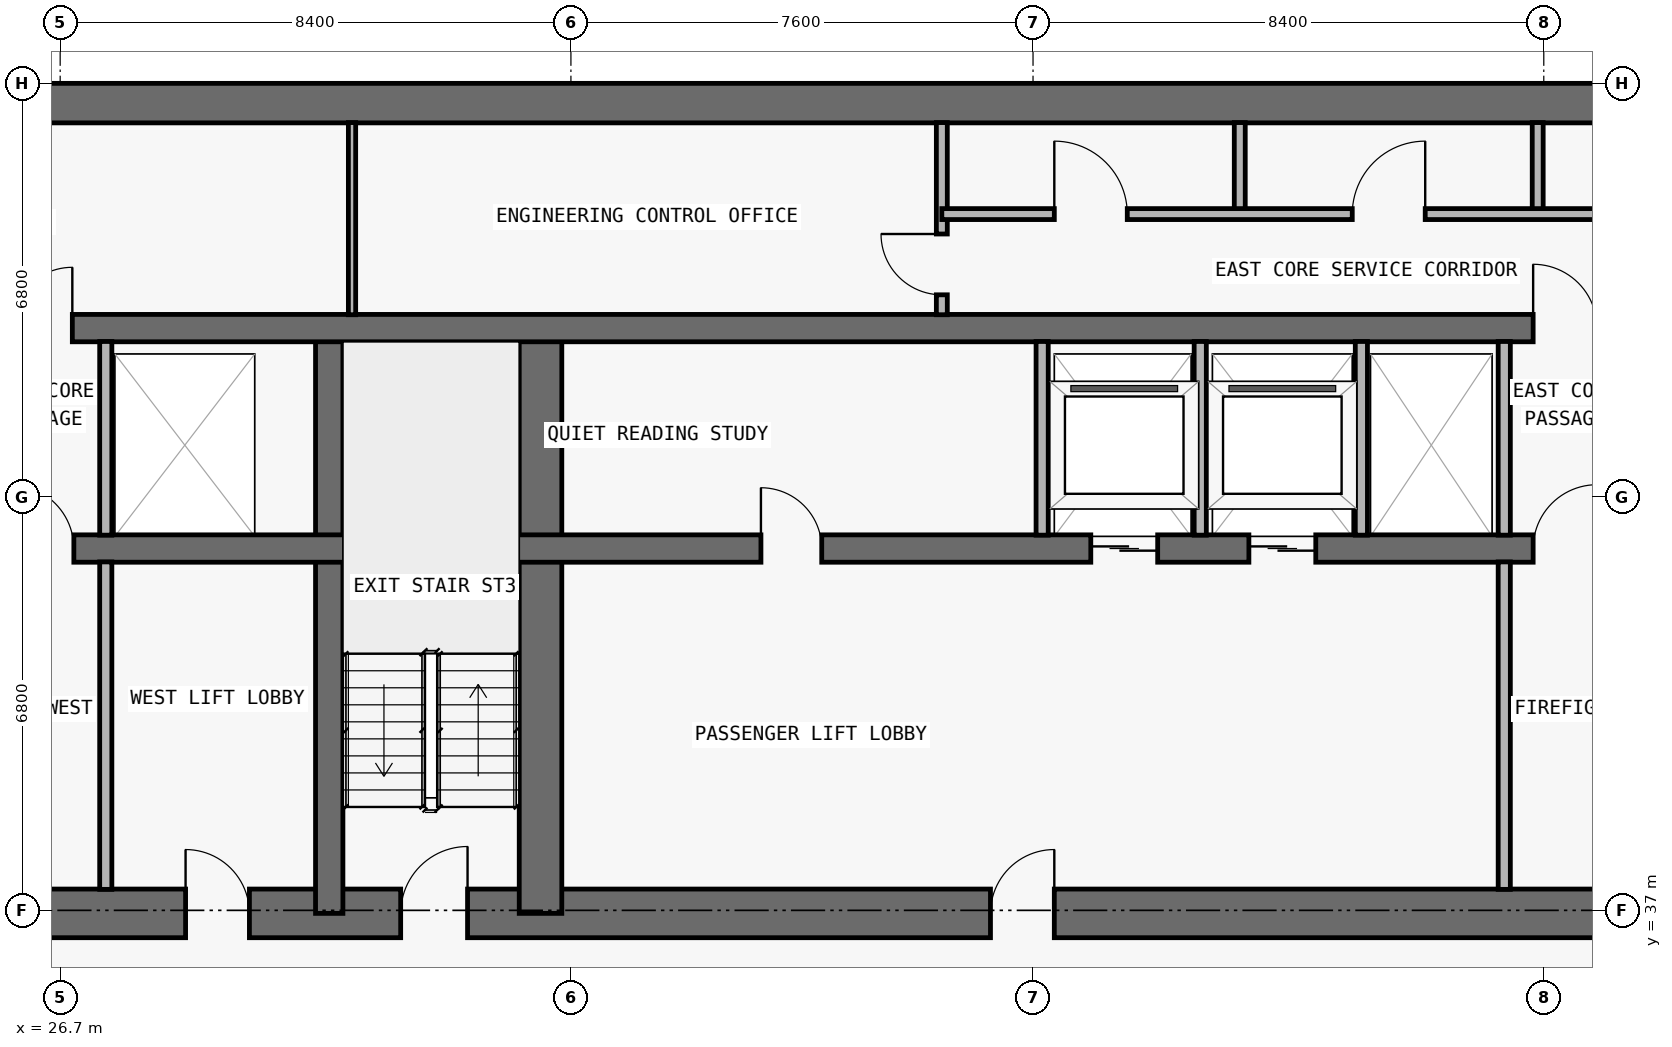
"""IFC4 building model, lengths in metres.
Left out: names, types, materials, properties, quantities, classifications, styles, units other than length and angle.
Written with IfcOpenShell. Run it as: python <this file> out.ifc"""

import sys

from ifc_helpers import new_model, si_unit, direction, frame, frame_2d, origin, place, context, subcontext, project, spatial, rectangle, extrude, element, fill, save


model = new_model("IFC4")
c1 = context("Model", 3, precision=1e-05, world=origin(), true_north=direction((0.0, 1.0)))
c2 = subcontext(c1, "Body", "Model", "MODEL_VIEW")
j1 = project(units=[si_unit("LENGTHUNIT", "METRE"), si_unit("PLANEANGLEUNIT", "RADIAN")], contexts=[c1])
p1 = place(None, origin())
s1 = spatial("IfcSite", under=j1, at=p1, CompositionType="ELEMENT")
p2 = place(p1, origin())
s2 = spatial("IfcBuilding", under=s1, at=p2, CompositionType="ELEMENT")
p3 = place(p2, frame((0.0, 0.0, 138.9)))
s3 = spatial("IfcBuildingStorey", under=s2, at=p3, CompositionType="ELEMENT", Elevation=138.9)
p4 = place(p3, frame((17.85, 36.95, 0.0), z_axis=(0.0, 0.0, 1.0), x_axis=(1.0, 0.0, 0.0)))
e1 = element("IfcWall", 1, at=p4, inside=s3, PredefinedType="SHEAR", context=c2, shape_type="SweptSolid", body=[
    extrude(rectangle(XDim=42.1, YDim=0.8, at=frame_2d((21.05, 0.0))), origin(), (0.0, 0.0, 1.0), 3.05),
])
p5 = place(p4, frame((14.45, 0.0, 0.0)))
e2 = element("IfcOpeningElement", 2, at=p5, cuts=e1, PredefinedType="OPENING", context=c2, shape_type="SweptSolid", body=[
    extrude(rectangle(XDim=1.1, YDim=2.15, at=frame_2d((0.55, 1.075))), frame((0.0, 0.41, 0.0), z_axis=(0.0, -1.0, 0.0), x_axis=(1.0, 0.0, 0.0)), (0.0, 0.0, 1.0), 0.82),
])
p6 = place(p4, frame((6.3, 0.0, 0.0)))
e3 = element("IfcOpeningElement", 3, at=p6, cuts=e1, PredefinedType="OPENING", context=c2, shape_type="SweptSolid", body=[
    extrude(rectangle(XDim=1.05, YDim=2.15, at=frame_2d((0.525, 1.075))), frame((0.0, 0.41, 0.0), z_axis=(0.0, -1.0, 0.0), x_axis=(1.0, 0.0, 0.0)), (0.0, 0.0, 1.0), 0.82),
])
p7 = place(p4, frame((34.8, 0.0, 0.0)))
e4 = element("IfcOpeningElement", 4, at=p7, cuts=e1, PredefinedType="OPENING", context=c2, shape_type="SweptSolid", body=[
    extrude(rectangle(XDim=1.05, YDim=2.15, at=frame_2d((0.525, 1.075))), frame((0.0, 0.41, 0.0), z_axis=(0.0, -1.0, 0.0), x_axis=(1.0, 0.0, 0.0)), (0.0, 0.0, 1.0), 0.82),
])
p8 = place(p4, frame((10.913, 0.0, 0.0)))
e5 = element("IfcOpeningElement", 5, at=p8, cuts=e1, PredefinedType="OPENING", context=c2, shape_type="SweptSolid", body=[
    extrude(rectangle(XDim=1.05, YDim=2.15, at=frame_2d((0.525, 1.075))), frame((0.0, 0.41, 0.0), z_axis=(0.0, -1.0, 0.0), x_axis=(1.0, 0.0, 0.0)), (0.0, 0.0, 1.0), 0.82),
])
p9 = place(p4, frame((24.15, 0.0, 0.0)))
e6 = element("IfcOpeningElement", 6, at=p9, cuts=e1, PredefinedType="OPENING", context=c2, shape_type="SweptSolid", body=[
    extrude(rectangle(XDim=1.05, YDim=2.15, at=frame_2d((0.525, 1.075))), frame((0.0, 0.41, 0.0), z_axis=(0.0, -1.0, 0.0), x_axis=(1.0, 0.0, 0.0)), (0.0, 0.0, 1.0), 0.82),
])
p10 = place(p3, frame((17.85, 50.275, 0.0), z_axis=(0.0, 0.0, 1.0), x_axis=(1.0, 0.0, 0.0)))
e7 = element("IfcWall", 7, at=p10, inside=s3, PredefinedType="SHEAR", context=c2, shape_type="SweptSolid", body=[
    extrude(rectangle(XDim=42.1, YDim=0.65, at=frame_2d((21.05, 0.0))), origin(), (0.0, 0.0, 1.0), 3.05),
])
p11 = place(p3, frame((31.125, 36.95, 0.0), z_axis=(0.0, 0.0, 1.0), x_axis=(0.0, 1.0, 0.0)))
e8 = element("IfcWall", 8, at=p11, inside=s3, PredefinedType="SHEAR", context=c2, shape_type="SweptSolid", body=[
    extrude(rectangle(XDim=9.625, YDim=0.45, at=frame_2d((4.812, 0.0))), origin(), (0.0, 0.0, 1.0), 3.05),
])
p12 = place(p3, frame((34.6, 36.95, 0.0), z_axis=(0.0, 0.0, 1.0), x_axis=(0.0, 1.0, 0.0)))
e9 = element("IfcWall", 9, at=p12, inside=s3, PredefinedType="SHEAR", context=c2, shape_type="SweptSolid", body=[
    extrude(rectangle(XDim=9.625, YDim=0.7, at=frame_2d((4.812, 0.0))), origin(), (0.0, 0.0, 1.0), 3.05),
])
p13 = place(p3, frame((22.25, 42.95, 0.0), z_axis=(0.0, 0.0, 1.0), x_axis=(1.0, 0.0, 0.0)))
e10 = element("IfcWall", 10, at=p13, inside=s3, PredefinedType="SHEAR", context=c2, shape_type="SweptSolid", body=[
    extrude(rectangle(XDim=33.3, YDim=0.45, at=frame_2d((16.65, 0.0))), origin(), (0.0, 0.0, 1.0), 3.05),
])
p14 = place(p13, frame((1.05, 0.0, 0.0)))
e11 = element("IfcOpeningElement", 11, at=p14, cuts=e10, PredefinedType="OPENING", context=c2, shape_type="SweptSolid", body=[
    extrude(rectangle(XDim=1.2, YDim=2.2, at=frame_2d((0.6, 1.1))), frame((0.0, 0.235, 0.0), z_axis=(0.0, -1.0, 0.0), x_axis=(1.0, 0.0, 0.0)), (0.0, 0.0, 1.0), 0.47),
])
p15 = place(p13, frame((31.05, 0.0, 0.0)))
e12 = element("IfcOpeningElement", 12, at=p15, cuts=e10, PredefinedType="OPENING", context=c2, shape_type="SweptSolid", body=[
    extrude(rectangle(XDim=1.2, YDim=2.2, at=frame_2d((0.6, 1.1))), frame((0.0, 0.235, 0.0), z_axis=(0.0, -1.0, 0.0), x_axis=(1.0, 0.0, 0.0)), (0.0, 0.0, 1.0), 0.47),
])
p16 = place(p13, frame((21.4, 0.0, 0.0)))
e13 = element("IfcOpeningElement", 13, at=p16, cuts=e10, PredefinedType="OPENING", context=c2, shape_type="SweptSolid", body=[
    extrude(rectangle(XDim=1.1, YDim=2.2, at=frame_2d((0.55, 1.1))), frame((0.0, 0.235, 0.0), z_axis=(0.0, -1.0, 0.0), x_axis=(1.0, 0.0, 0.0)), (0.0, 0.0, 1.0), 0.47),
])
p17 = place(p13, frame((24.0, 0.0, 0.0)))
e14 = element("IfcOpeningElement", 14, at=p17, cuts=e10, PredefinedType="OPENING", context=c2, shape_type="SweptSolid", body=[
    extrude(rectangle(XDim=1.1, YDim=2.2, at=frame_2d((0.55, 1.1))), frame((0.0, 0.235, 0.0), z_axis=(0.0, -1.0, 0.0), x_axis=(1.0, 0.0, 0.0)), (0.0, 0.0, 1.0), 0.47),
])
p18 = place(p13, frame((3.625, 0.0, 0.0)))
e15 = element("IfcOpeningElement", 15, at=p18, cuts=e10, PredefinedType="OPENING", context=c2, shape_type="SweptSolid", body=[
    extrude(rectangle(XDim=1.05, YDim=2.15, at=frame_2d((0.525, 1.075))), frame((0.0, 0.235, 0.0), z_axis=(0.0, -1.0, 0.0), x_axis=(1.0, 0.0, 0.0)), (0.0, 0.0, 1.0), 0.47),
])
p19 = place(p13, frame((28.675, 0.0, 0.0)))
e16 = element("IfcOpeningElement", 16, at=p19, cuts=e10, PredefinedType="OPENING", context=c2, shape_type="SweptSolid", body=[
    extrude(rectangle(XDim=1.05, YDim=2.15, at=frame_2d((0.525, 1.075))), frame((0.0, 0.235, 0.0), z_axis=(0.0, -1.0, 0.0), x_axis=(1.0, 0.0, 0.0)), (0.0, 0.0, 1.0), 0.47),
])
p20 = place(p13, frame((15.975, 0.0, 0.0)))
e17 = element("IfcOpeningElement", 17, at=p20, cuts=e10, PredefinedType="OPENING", context=c2, shape_type="SweptSolid", body=[
    extrude(rectangle(XDim=1.0, YDim=2.2, at=frame_2d((0.5, 1.1))), frame((0.0, 0.235, 0.0), z_axis=(0.0, -1.0, 0.0), x_axis=(1.0, 0.0, 0.0)), (0.0, 0.0, 1.0), 0.47),
])
p21 = place(p3, frame((18.25, 46.575, 0.0), z_axis=(0.0, 0.0, 1.0), x_axis=(1.0, 0.0, 0.0)))
e18 = element("IfcWall", 18, at=p21, inside=s3, PredefinedType="SHEAR", context=c2, shape_type="SweptSolid", body=[
    extrude(rectangle(XDim=41.3, YDim=0.45, at=frame_2d((20.65, 0.0))), origin(), (0.0, 0.0, 1.0), 3.05),
])
p22 = place(p21, frame((7.65, 0.0, 0.0)))
e19 = element("IfcOpeningElement", 19, at=p22, cuts=e18, PredefinedType="OPENING", context=c2, shape_type="SweptSolid", body=[
    extrude(rectangle(XDim=1.0, YDim=2.2, at=frame_2d((0.5, 1.1))), frame((0.0, 0.235, 0.0), z_axis=(0.0, -1.0, 0.0), x_axis=(1.0, 0.0, 0.0)), (0.0, 0.0, 1.0), 0.47),
])
p23 = place(p21, frame((32.675, 0.0, 0.0)))
e20 = element("IfcOpeningElement", 20, at=p23, cuts=e18, PredefinedType="OPENING", context=c2, shape_type="SweptSolid", body=[
    extrude(rectangle(XDim=1.05, YDim=2.15, at=frame_2d((0.525, 1.075))), frame((0.0, 0.235, 0.0), z_axis=(0.0, -1.0, 0.0), x_axis=(1.0, 0.0, 0.0)), (0.0, 0.0, 1.0), 0.47),
])
p24 = place(p3, frame((27.45, 37.345, 0.0), z_axis=(0.0, 0.0, 1.0), x_axis=(0.0, 1.0, 0.0)))
e21 = element("IfcWall", 21, at=p24, inside=s3, PredefinedType="PARTITIONING", context=c2, shape_type="SweptSolid", body=[
    extrude(rectangle(XDim=5.385, YDim=0.2, at=frame_2d((2.692, 0.0))), origin(), (0.0, 0.0, 1.0), 3.05),
])
p25 = place(p3, frame((27.45, 43.17, 0.0), z_axis=(0.0, 0.0, 1.0), x_axis=(0.0, 1.0, 0.0)))
e22 = element("IfcWall", 22, at=p25, inside=s3, PredefinedType="PARTITIONING", context=c2, shape_type="SweptSolid", body=[
    extrude(rectangle(XDim=3.185, YDim=0.2, at=frame_2d((1.593, 0.0))), origin(), (0.0, 0.0, 1.0), 3.05),
])
p26 = place(p3, frame((31.5, 46.795, 0.0), z_axis=(0.0, 0.0, 1.0), x_axis=(0.0, 1.0, 0.0)))
e23 = element("IfcWall", 23, at=p26, inside=s3, PredefinedType="PARTITIONING", context=c2, shape_type="SweptSolid", body=[
    extrude(rectangle(XDim=3.16, YDim=0.12, at=frame_2d((1.58, 0.0))), origin(), (0.0, 0.0, 1.0), 3.05),
])
p27 = place(p3, frame((41.2, 46.795, 0.0), z_axis=(0.0, 0.0, 1.0), x_axis=(0.0, 1.0, 0.0)))
e24 = element("IfcWall", 24, at=p27, inside=s3, PredefinedType="PARTITIONING", context=c2, shape_type="SweptSolid", body=[
    extrude(rectangle(XDim=3.16, YDim=0.18, at=frame_2d((1.58, 0.0))), origin(), (0.0, 0.0, 1.0), 3.05),
])
p28 = place(p27, frame((0.327, 0.0, 0.0)))
e25 = element("IfcOpeningElement", 25, at=p28, cuts=e24, PredefinedType="OPENING", context=c2, shape_type="SweptSolid", body=[
    extrude(rectangle(XDim=1.0, YDim=2.2, at=frame_2d((0.5, 1.1))), frame((0.0, 0.1, 0.0), z_axis=(0.0, -1.0, 0.0), x_axis=(1.0, 0.0, 0.0)), (0.0, 0.0, 1.0), 0.2),
])
for number, where, z_axis, x_axis in (
    (26, (42.85, 43.17, 0.0), (0.0, 0.0, 1.0), (0.0, 1.0, 0.0)),
    (27, (45.45, 43.17, 0.0), (0.0, 0.0, 1.0), (0.0, 1.0, 0.0)),
):
    element("IfcWall", number, at=place(p3, frame(where, z_axis=z_axis, x_axis=x_axis)), inside=s3, PredefinedType="PARTITIONING", context=c2, shape_type="SweptSolid", body=[
        extrude(rectangle(XDim=3.185, YDim=0.2, at=frame_2d((1.593, 0.0))), origin(), (0.0, 0.0, 1.0), 3.05),
    ])
p29 = place(p3, frame((46.1, 48.45, 0.0), z_axis=(0.0, 0.0, 1.0), x_axis=(0.0, 1.0, 0.0)))
e28 = element("IfcWall", 28, at=p29, inside=s3, PredefinedType="PARTITIONING", context=c2, shape_type="SweptSolid", body=[
    extrude(rectangle(XDim=1.505, YDim=0.18, at=frame_2d((0.752, 0.0))), origin(), (0.0, 0.0, 1.0), 3.05),
])
p30 = place(p3, frame((48.1, 43.17, 0.0), z_axis=(0.0, 0.0, 1.0), x_axis=(0.0, 1.0, 0.0)))
e29 = element("IfcWall", 29, at=p30, inside=s3, PredefinedType="PARTITIONING", context=c2, shape_type="SweptSolid", body=[
    extrude(rectangle(XDim=3.185, YDim=0.2, at=frame_2d((1.593, 0.0))), origin(), (0.0, 0.0, 1.0), 3.05),
])
p31 = place(p3, frame((50.45, 37.345, 0.0), z_axis=(0.0, 0.0, 1.0), x_axis=(0.0, 1.0, 0.0)))
e30 = element("IfcWall", 30, at=p31, inside=s3, PredefinedType="PARTITIONING", context=c2, shape_type="SweptSolid", body=[
    extrude(rectangle(XDim=5.385, YDim=0.2, at=frame_2d((2.692, 0.0))), origin(), (0.0, 0.0, 1.0), 3.05),
])
p32 = place(p3, frame((50.45, 43.17, 0.0), z_axis=(0.0, 0.0, 1.0), x_axis=(0.0, 1.0, 0.0)))
e31 = element("IfcWall", 31, at=p32, inside=s3, PredefinedType="PARTITIONING", context=c2, shape_type="SweptSolid", body=[
    extrude(rectangle(XDim=3.185, YDim=0.2, at=frame_2d((1.593, 0.0))), origin(), (0.0, 0.0, 1.0), 3.05),
])
p33 = place(p3, frame((51.0, 48.45, 0.0), z_axis=(0.0, 0.0, 1.0), x_axis=(0.0, 1.0, 0.0)))
e32 = element("IfcWall", 32, at=p33, inside=s3, PredefinedType="PARTITIONING", context=c2, shape_type="SweptSolid", body=[
    extrude(rectangle(XDim=1.505, YDim=0.18, at=frame_2d((0.752, 0.0))), origin(), (0.0, 0.0, 1.0), 3.05),
])
p34 = place(p3, frame((41.2, 48.45, 0.0), z_axis=(0.0, 0.0, 1.0), x_axis=(1.0, 0.0, 0.0)))
e33 = element("IfcWall", 33, at=p34, inside=s3, PredefinedType="PARTITIONING", context=c2, shape_type="SweptSolid", body=[
    extrude(rectangle(XDim=14.686, YDim=0.18, at=frame_2d((7.343, 0.0))), origin(), (0.0, 0.0, 1.0), 3.05),
])
p35 = place(p34, frame((1.85, 0.0, 0.0)))
e34 = element("IfcOpeningElement", 34, at=p35, cuts=e33, PredefinedType="OPENING", context=c2, shape_type="SweptSolid", body=[
    extrude(rectangle(XDim=1.2, YDim=2.2, at=frame_2d((0.6, 1.1))), frame((0.0, 0.1, 0.0), z_axis=(0.0, -1.0, 0.0), x_axis=(1.0, 0.0, 0.0)), (0.0, 0.0, 1.0), 0.2),
])
p36 = place(p34, frame((6.75, 0.0, 0.0)))
e35 = element("IfcOpeningElement", 35, at=p36, cuts=e33, PredefinedType="OPENING", context=c2, shape_type="SweptSolid", body=[
    extrude(rectangle(XDim=1.2, YDim=2.2, at=frame_2d((0.6, 1.1))), frame((0.0, 0.1, 0.0), z_axis=(0.0, -1.0, 0.0), x_axis=(1.0, 0.0, 0.0)), (0.0, 0.0, 1.0), 0.2),
])
p37 = place(p34, frame((11.818, 0.0, 0.0)))
e36 = element("IfcOpeningElement", 36, at=p37, cuts=e33, PredefinedType="OPENING", context=c2, shape_type="SweptSolid", body=[
    extrude(rectangle(XDim=0.85, YDim=2.1, at=frame_2d((0.425, 1.05))), frame((0.0, 0.1, 0.0), z_axis=(0.0, -1.0, 0.0), x_axis=(1.0, 0.0, 0.0)), (0.0, 0.0, 1.0), 0.2),
])
p38 = place(p16, origin())
e37 = element("IfcDoor", 37, at=p38, inside=s3, OperationType="DOUBLE_DOOR_SLIDING", PredefinedType="DOOR", context=c2, shape_type="SweptSolid", body=[
    extrude(rectangle(XDim=1.1, YDim=2.2, at=frame_2d((0.55, 1.1))), frame((0.0, 0.025, 0.0), z_axis=(0.0, -1.0, 0.0), x_axis=(1.0, 0.0, 0.0)), (0.0, 0.0, 1.0), 0.05),
])
fill(e13, e37)
p39 = place(p17, origin())
e38 = element("IfcDoor", 38, at=p39, inside=s3, OperationType="DOUBLE_DOOR_SLIDING", PredefinedType="DOOR", context=c2, shape_type="SweptSolid", body=[
    extrude(rectangle(XDim=1.1, YDim=2.2, at=frame_2d((0.55, 1.1))), frame((0.0, 0.025, 0.0), z_axis=(0.0, -1.0, 0.0), x_axis=(1.0, 0.0, 0.0)), (0.0, 0.0, 1.0), 0.05),
])
fill(e14, e38)
p40 = place(p5, origin())
e39 = element("IfcDoor", 39, at=p40, inside=s3, OperationType="SINGLE_SWING_RIGHT", PredefinedType="DOOR", context=c2, shape_type="SweptSolid", body=[
    extrude(rectangle(XDim=1.1, YDim=2.15, at=frame_2d((0.55, 1.075))), frame((0.0, 0.025, 0.0), z_axis=(0.0, -1.0, 0.0), x_axis=(1.0, 0.0, 0.0)), (0.0, 0.0, 1.0), 0.05),
])
fill(e2, e39)
p41 = place(p18, origin())
e40 = element("IfcDoor", 40, at=p41, inside=s3, OperationType="SINGLE_SWING_LEFT", PredefinedType="DOOR", context=c2, shape_type="SweptSolid", body=[
    extrude(rectangle(XDim=1.05, YDim=2.15, at=frame_2d((0.525, 1.075))), frame((0.0, 0.025, 0.0), z_axis=(0.0, -1.0, 0.0), x_axis=(1.0, 0.0, 0.0)), (0.0, 0.0, 1.0), 0.05),
])
fill(e15, e40)
p42 = place(p19, origin())
e41 = element("IfcDoor", 41, at=p42, inside=s3, OperationType="SINGLE_SWING_RIGHT", PredefinedType="DOOR", context=c2, shape_type="SweptSolid", body=[
    extrude(rectangle(XDim=1.05, YDim=2.15, at=frame_2d((0.525, 1.075))), frame((0.0, 0.025, 0.0), z_axis=(0.0, -1.0, 0.0), x_axis=(1.0, 0.0, 0.0)), (0.0, 0.0, 1.0), 0.05),
])
fill(e16, e41)
p43 = place(p8, origin())
e42 = element("IfcDoor", 42, at=p43, inside=s3, OperationType="SINGLE_SWING_LEFT", PredefinedType="DOOR", context=c2, shape_type="SweptSolid", body=[
    extrude(rectangle(XDim=1.05, YDim=2.15, at=frame_2d((0.525, 1.075))), frame((0.0, 0.025, 0.0), z_axis=(0.0, -1.0, 0.0), x_axis=(1.0, 0.0, 0.0)), (0.0, 0.0, 1.0), 0.05),
])
fill(e5, e42)
p44 = place(p9, origin())
e43 = element("IfcDoor", 43, at=p44, inside=s3, OperationType="SINGLE_SWING_RIGHT", PredefinedType="DOOR", context=c2, shape_type="SweptSolid", body=[
    extrude(rectangle(XDim=1.05, YDim=2.15, at=frame_2d((0.525, 1.075))), frame((0.0, 0.025, 0.0), z_axis=(0.0, -1.0, 0.0), x_axis=(1.0, 0.0, 0.0)), (0.0, 0.0, 1.0), 0.05),
])
fill(e6, e43)
p45 = place(p20, origin())
e44 = element("IfcDoor", 44, at=p45, inside=s3, OperationType="SINGLE_SWING_LEFT", PredefinedType="DOOR", context=c2, shape_type="SweptSolid", body=[
    extrude(rectangle(XDim=1.0, YDim=2.2, at=frame_2d((0.5, 1.1))), frame((0.0, 0.025, 0.0), z_axis=(0.0, -1.0, 0.0), x_axis=(1.0, 0.0, 0.0)), (0.0, 0.0, 1.0), 0.05),
])
fill(e17, e44)
p46 = place(p22, origin())
e45 = element("IfcDoor", 45, at=p46, inside=s3, OperationType="SINGLE_SWING_RIGHT", PredefinedType="DOOR", context=c2, shape_type="SweptSolid", body=[
    extrude(rectangle(XDim=1.0, YDim=2.2, at=frame_2d((0.5, 1.1))), frame((0.0, 0.025, 0.0), z_axis=(0.0, -1.0, 0.0), x_axis=(1.0, 0.0, 0.0)), (0.0, 0.0, 1.0), 0.05),
])
fill(e19, e45)
p47 = place(p23, origin())
e46 = element("IfcDoor", 46, at=p47, inside=s3, OperationType="SINGLE_SWING_LEFT", PredefinedType="DOOR", context=c2, shape_type="SweptSolid", body=[
    extrude(rectangle(XDim=1.05, YDim=2.15, at=frame_2d((0.525, 1.075))), frame((0.0, 0.025, 0.0), z_axis=(0.0, -1.0, 0.0), x_axis=(1.0, 0.0, 0.0)), (0.0, 0.0, 1.0), 0.05),
])
fill(e20, e46)
p48 = place(p28, origin())
e47 = element("IfcDoor", 47, at=p48, inside=s3, OperationType="SINGLE_SWING_RIGHT", PredefinedType="DOOR", context=c2, shape_type="SweptSolid", body=[
    extrude(rectangle(XDim=1.0, YDim=2.2, at=frame_2d((0.5, 1.1))), frame((0.0, 0.025, 0.0), z_axis=(0.0, -1.0, 0.0), x_axis=(1.0, 0.0, 0.0)), (0.0, 0.0, 1.0), 0.05),
])
fill(e25, e47)
p49 = place(p35, origin())
e48 = element("IfcDoor", 48, at=p49, inside=s3, OperationType="SINGLE_SWING_LEFT", PredefinedType="DOOR", context=c2, shape_type="SweptSolid", body=[
    extrude(rectangle(XDim=1.2, YDim=2.2, at=frame_2d((0.6, 1.1))), frame((0.0, 0.025, 0.0), z_axis=(0.0, -1.0, 0.0), x_axis=(1.0, 0.0, 0.0)), (0.0, 0.0, 1.0), 0.05),
])
fill(e34, e48)
p50 = place(p36, origin())
e49 = element("IfcDoor", 49, at=p50, inside=s3, OperationType="SINGLE_SWING_RIGHT", PredefinedType="DOOR", context=c2, shape_type="SweptSolid", body=[
    extrude(rectangle(XDim=1.2, YDim=2.2, at=frame_2d((0.6, 1.1))), frame((0.0, 0.025, 0.0), z_axis=(0.0, -1.0, 0.0), x_axis=(1.0, 0.0, 0.0)), (0.0, 0.0, 1.0), 0.05),
])
fill(e35, e49)
save(model, sys.argv[1])
